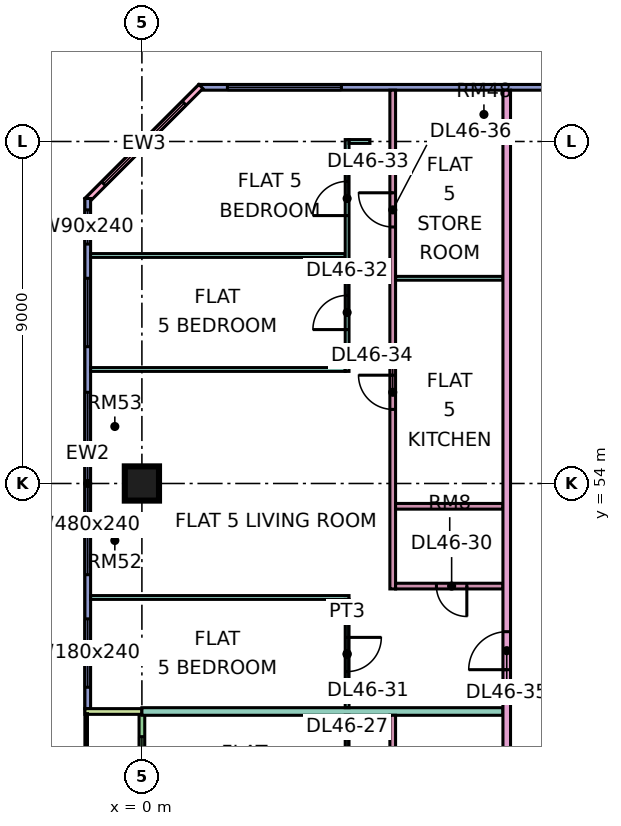
"""IFC4 building model, lengths in metres.
Left out: names, types, materials, properties, quantities, classifications, styles, units other than length and angle.
Written with IfcOpenShell. Run it as: python <this file> out.ifc"""

import sys

from ifc_helpers import new_model, si_unit, direction, frame, frame_2d, origin, origin_2d, place, context, subcontext, project, spatial, rectangle, extrude, element, fill, save


model = new_model("IFC4")
c1 = context("Model", 3, precision=1e-05, world=origin(), true_north=direction((0.0, 1.0)))
c2 = subcontext(c1, "Body", "Model", "MODEL_VIEW")
j1 = project(units=[si_unit("LENGTHUNIT", "METRE"), si_unit("PLANEANGLEUNIT", "RADIAN")], contexts=[c1])
p1 = place(None, origin())
s1 = spatial("IfcSite", under=j1, at=p1, CompositionType="ELEMENT")
p2 = place(p1, origin())
s2 = spatial("IfcBuilding", under=s1, at=p2, CompositionType="ELEMENT")
p3 = place(p2, frame((0.0, 0.0, 198.65)))
s3 = spatial("IfcBuildingStorey", under=s2, at=p3, CompositionType="ELEMENT", Elevation=198.65)
p4 = place(p3, frame((0.0, 54.0, 0.0), z_axis=(0.0, 0.0, 1.0), x_axis=(1.0, 0.0, 0.0)))
e1 = element("IfcColumn", 1, at=p4, inside=s3, PredefinedType="COLUMN", context=c2, shape_type="SweptSolid", body=[
    extrude(rectangle(XDim=0.9, YDim=0.9, at=origin_2d()), origin(), (0.0, 0.0, 1.0), 3.75),
])
p5 = place(p3, frame((11.925, 64.425, 0.0), z_axis=(0.0, 0.0, 1.0), x_axis=(-1.0, 0.0, 0.0)))
e2 = element("IfcWall", 2, at=p5, inside=s3, PredefinedType="SOLIDWALL", context=c2, shape_type="SweptSolid", body=[
    extrude(rectangle(XDim=10.425, YDim=0.15, at=frame_2d((5.212, 0.0))), origin(), (0.0, 0.0, 1.0), 3.35),
])
p6 = place(p5, frame((6.675, 0.0, 0.45)))
e3 = element("IfcOpeningElement", 3, at=p6, cuts=e2, PredefinedType="OPENING", context=c2, shape_type="SweptSolid", body=[
    extrude(rectangle(XDim=3.0, YDim=2.4, at=frame_2d((1.5, 1.2))), frame((0.0, 0.085, 0.0), z_axis=(0.0, -1.0, 0.0), x_axis=(1.0, 0.0, 0.0)), (0.0, 0.0, 1.0), 0.17),
])
p7 = place(p3, frame((1.553, 64.447, 0.0), z_axis=(0.0, 0.0, 1.0), x_axis=(-0.707106781187, -0.707106781187, 0.0)))
e4 = element("IfcWall", 4, at=p7, inside=s3, PredefinedType="SOLIDWALL", context=c2, shape_type="SweptSolid", body=[
    extrude(rectangle(XDim=4.243, YDim=0.15, at=frame_2d((2.121, 0.0))), origin(), (0.0, 0.0, 1.0), 3.35),
])
p8 = place(p7, frame((0.621, 0.0, 0.45)))
e5 = element("IfcOpeningElement", 5, at=p8, cuts=e4, PredefinedType="OPENING", context=c2, shape_type="SweptSolid", body=[
    extrude(rectangle(XDim=3.0, YDim=2.4, at=frame_2d((1.5, 1.2))), frame((0.0, 0.085, 0.0), z_axis=(0.0, -1.0, 0.0), x_axis=(1.0, 0.0, 0.0)), (0.0, 0.0, 1.0), 0.17),
])
p9 = place(p3, frame((-1.425, 61.5, 0.0), z_axis=(0.0, 0.0, 1.0), x_axis=(0.0, -1.0, 0.0)))
e6 = element("IfcWall", 6, at=p9, inside=s3, PredefinedType="SOLIDWALL", context=c2, shape_type="SweptSolid", body=[
    extrude(rectangle(XDim=13.425, YDim=0.15, at=frame_2d((6.712, 0.0))), origin(), (0.0, 0.0, 1.0), 3.35),
])
p10 = place(p9, frame((0.3, 0.0, 0.45)))
e7 = element("IfcOpeningElement", 7, at=p10, cuts=e6, PredefinedType="OPENING", context=c2, shape_type="SweptSolid", body=[
    extrude(rectangle(XDim=0.9, YDim=2.4, at=frame_2d((0.45, 1.2))), frame((0.0, 0.085, 0.0), z_axis=(0.0, -1.0, 0.0), x_axis=(1.0, 0.0, 0.0)), (0.0, 0.0, 1.0), 0.17),
])
p11 = place(p9, frame((2.1, 0.0, 0.45)))
e8 = element("IfcOpeningElement", 8, at=p11, cuts=e6, PredefinedType="OPENING", context=c2, shape_type="SweptSolid", body=[
    extrude(rectangle(XDim=1.8, YDim=2.4, at=frame_2d((0.9, 1.2))), frame((0.0, 0.085, 0.0), z_axis=(0.0, -1.0, 0.0), x_axis=(1.0, 0.0, 0.0)), (0.0, 0.0, 1.0), 0.17),
])
p12 = place(p9, frame((5.1, 0.0, 0.45)))
e9 = element("IfcOpeningElement", 9, at=p12, cuts=e6, PredefinedType="OPENING", context=c2, shape_type="SweptSolid", body=[
    extrude(rectangle(XDim=4.8, YDim=2.4, at=frame_2d((2.4, 1.2))), frame((0.0, 0.085, 0.0), z_axis=(0.0, -1.0, 0.0), x_axis=(1.0, 0.0, 0.0)), (0.0, 0.0, 1.0), 0.17),
])
p13 = place(p9, frame((11.062, 0.0, 0.45)))
e10 = element("IfcOpeningElement", 10, at=p13, cuts=e6, PredefinedType="OPENING", context=c2, shape_type="SweptSolid", body=[
    extrude(rectangle(XDim=1.8, YDim=2.4, at=frame_2d((0.9, 1.2))), frame((0.0, 0.085, 0.0), z_axis=(0.0, -1.0, 0.0), x_axis=(1.0, 0.0, 0.0)), (0.0, 0.0, 1.0), 0.17),
])
p14 = place(p3, frame((0.0, 47.925, 0.0), z_axis=(0.0, 0.0, 1.0), x_axis=(0.0, -1.0, 0.0)))
e11 = element("IfcWall", 11, at=p14, inside=s3, PredefinedType="SOLIDWALL", context=c2, shape_type="SweptSolid", body=[
    extrude(rectangle(XDim=11.85, YDim=0.15, at=frame_2d((5.925, 0.0))), origin(), (0.0, 0.0, 1.0), 3.35),
])
p15 = place(p14, frame((0.587, 0.0, 0.45)))
e12 = element("IfcOpeningElement", 12, at=p15, cuts=e11, PredefinedType="OPENING", context=c2, shape_type="SweptSolid", body=[
    extrude(rectangle(XDim=1.2, YDim=2.4, at=frame_2d((0.6, 1.2))), frame((0.0, 0.085, 0.0), z_axis=(0.0, -1.0, 0.0), x_axis=(1.0, 0.0, 0.0)), (0.0, 0.0, 1.0), 0.17),
])
p16 = place(p14, frame((5.3, 0.0, 0.0)))
e13 = element("IfcOpeningElement", 13, at=p16, cuts=e11, PredefinedType="OPENING", context=c2, shape_type="SweptSolid", body=[
    extrude(rectangle(XDim=1.8, YDim=2.4, at=frame_2d((0.9, 1.2))), frame((0.0, 0.085, 0.0), z_axis=(0.0, -1.0, 0.0), x_axis=(1.0, 0.0, 0.0)), (0.0, 0.0, 1.0), 0.17),
])
p17 = place(p14, frame((9.55, 0.0, 0.45)))
e14 = element("IfcOpeningElement", 14, at=p17, cuts=e11, PredefinedType="OPENING", context=c2, shape_type="SweptSolid", body=[
    extrude(rectangle(XDim=1.2, YDim=2.4, at=frame_2d((0.6, 1.2))), frame((0.0, 0.085, 0.0), z_axis=(0.0, -1.0, 0.0), x_axis=(1.0, 0.0, 0.0)), (0.0, 0.0, 1.0), 0.17),
])
p18 = place(p3, frame((-1.5, 48.0, 0.0), z_axis=(0.0, 0.0, 1.0), x_axis=(1.0, 0.0, 0.0)))
e15 = element("IfcWall", 15, at=p18, inside=s3, PredefinedType="SOLIDWALL", context=c2, shape_type="SweptSolid", body=[
    extrude(rectangle(XDim=1.5, YDim=0.15, at=frame_2d((0.75, 0.0))), origin(), (0.0, 0.0, 1.0), 3.35),
])
p19 = place(p3, frame((-1.351, 60.0, 0.0), z_axis=(0.0, 0.0, 1.0), x_axis=(1.0, 0.0, 0.0)))
e16 = element("IfcWall", 16, at=p19, inside=s3, PredefinedType="PARTITIONING", context=c2, shape_type="SweptSolid", body=[
    extrude(rectangle(XDim=6.701, YDim=0.1, at=frame_2d((3.351, 0.0))), origin(), (0.0, 0.0, 1.0), 3.35),
])
p20 = place(p3, frame((0.0, 48.0, 0.0), z_axis=(0.0, 0.0, 1.0), x_axis=(1.0, 0.0, 0.0)))
e17 = element("IfcWall", 17, at=p20, inside=s3, PredefinedType="PARTITIONING", context=c2, shape_type="SweptSolid", body=[
    extrude(rectangle(XDim=9.5, YDim=0.2, at=frame_2d((4.75, 0.0))), origin(), (0.0, 0.0, 1.0), 3.35),
])
p21 = place(p3, frame((-1.35, 51.0, 0.0), z_axis=(0.0, 0.0, 1.0), x_axis=(1.0, 0.0, 0.0)))
e18 = element("IfcWall", 18, at=p21, inside=s3, PredefinedType="PARTITIONING", context=c2, shape_type="SweptSolid", body=[
    extrude(rectangle(XDim=6.8, YDim=0.1, at=frame_2d((3.4, 0.0))), origin(), (0.0, 0.0, 1.0), 3.35),
])
p22 = place(p3, frame((-1.35, 57.0, 0.0), z_axis=(0.0, 0.0, 1.0), x_axis=(1.0, 0.0, 0.0)))
e19 = element("IfcWall", 19, at=p22, inside=s3, PredefinedType="PARTITIONING", context=c2, shape_type="SweptSolid", body=[
    extrude(rectangle(XDim=6.7, YDim=0.1, at=frame_2d((3.35, 0.0))), origin(), (0.0, 0.0, 1.0), 3.35),
])
p23 = place(p3, frame((5.4, 45.05, 0.0), z_axis=(0.0, 0.0, 1.0), x_axis=(0.0, 1.0, 0.0)))
e20 = element("IfcWall", 20, at=p23, inside=s3, PredefinedType="PARTITIONING", context=c2, shape_type="SweptSolid", body=[
    extrude(rectangle(XDim=2.85, YDim=0.1, at=frame_2d((1.425, 0.0))), origin(), (0.0, 0.0, 1.0), 3.35),
])
p24 = place(p23, frame((1.0, 0.0, 0.0)))
e21 = element("IfcOpeningElement", 21, at=p24, cuts=e20, PredefinedType="OPENING", context=c2, shape_type="SweptSolid", body=[
    extrude(rectangle(XDim=0.9, YDim=2.1, at=frame_2d((0.45, 1.05))), frame((0.0, 0.06, 0.0), z_axis=(0.0, -1.0, 0.0), x_axis=(1.0, 0.0, 0.0)), (0.0, 0.0, 1.0), 0.12),
])
p25 = place(p3, frame((5.4, 48.1, 0.0), z_axis=(0.0, 0.0, 1.0), x_axis=(0.0, 1.0, 0.0)))
e22 = element("IfcWall", 22, at=p25, inside=s3, PredefinedType="PARTITIONING", context=c2, shape_type="SweptSolid", body=[
    extrude(rectangle(XDim=2.85, YDim=0.1, at=frame_2d((1.425, 0.0))), origin(), (0.0, 0.0, 1.0), 3.35),
])
p26 = place(p25, frame((0.95, 0.0, 0.0)))
e23 = element("IfcOpeningElement", 23, at=p26, cuts=e22, PredefinedType="OPENING", context=c2, shape_type="SweptSolid", body=[
    extrude(rectangle(XDim=0.9, YDim=2.1, at=frame_2d((0.45, 1.05))), frame((0.0, 0.06, 0.0), z_axis=(0.0, -1.0, 0.0), x_axis=(1.0, 0.0, 0.0)), (0.0, 0.0, 1.0), 0.12),
])
p27 = place(p3, frame((5.4, 56.95, 0.0), z_axis=(0.0, 0.0, 1.0), x_axis=(0.0, 1.0, 0.0)))
e24 = element("IfcWall", 24, at=p27, inside=s3, PredefinedType="PARTITIONING", context=c2, shape_type="SweptSolid", body=[
    extrude(rectangle(XDim=6.1, YDim=0.1, at=frame_2d((3.05, 0.0))), origin(), (0.0, 0.0, 1.0), 3.35),
])
p28 = place(p27, frame((1.1, 0.0, 0.0)))
e25 = element("IfcOpeningElement", 25, at=p28, cuts=e24, PredefinedType="OPENING", context=c2, shape_type="SweptSolid", body=[
    extrude(rectangle(XDim=0.9, YDim=2.1, at=frame_2d((0.45, 1.05))), frame((0.0, 0.06, 0.0), z_axis=(0.0, -1.0, 0.0), x_axis=(1.0, 0.0, 0.0)), (0.0, 0.0, 1.0), 0.12),
])
p29 = place(p27, frame((4.1, 0.0, 0.0)))
e26 = element("IfcOpeningElement", 26, at=p29, cuts=e24, PredefinedType="OPENING", context=c2, shape_type="SweptSolid", body=[
    extrude(rectangle(XDim=0.9, YDim=2.1, at=frame_2d((0.45, 1.05))), frame((0.0, 0.06, 0.0), z_axis=(0.0, -1.0, 0.0), x_axis=(1.0, 0.0, 0.0)), (0.0, 0.0, 1.0), 0.12),
])
p30 = place(p3, frame((5.45, 63.0, 0.0), z_axis=(0.0, 0.0, 1.0), x_axis=(1.0, 0.0, 0.0)))
e27 = element("IfcWall", 27, at=p30, inside=s3, PredefinedType="PARTITIONING", context=c2, shape_type="SweptSolid", body=[
    extrude(rectangle(XDim=0.55, YDim=0.1, at=frame_2d((0.275, 0.0))), origin(), (0.0, 0.0, 1.0), 3.35),
])
p31 = place(p3, frame((6.6, 39.225, 0.0), z_axis=(0.0, 0.0, 1.0), x_axis=(0.0, 1.0, 0.0)))
e28 = element("IfcWall", 28, at=p31, inside=s3, PredefinedType="PARTITIONING", context=c2, shape_type="SweptSolid", body=[
    extrude(rectangle(XDim=8.675, YDim=0.15, at=frame_2d((4.337, 0.0))), origin(), (0.0, 0.0, 1.0), 3.35),
])
p32 = place(p31, frame((1.125, 0.0, 0.0)))
e29 = element("IfcOpeningElement", 29, at=p32, cuts=e28, PredefinedType="OPENING", context=c2, shape_type="SweptSolid", body=[
    extrude(rectangle(XDim=0.8, YDim=2.1, at=frame_2d((0.4, 1.05))), frame((0.0, 0.085, 0.0), z_axis=(0.0, -1.0, 0.0), x_axis=(1.0, 0.0, 0.0)), (0.0, 0.0, 1.0), 0.17),
])
p33 = place(p31, frame((5.475, 0.0, 0.0)))
e30 = element("IfcOpeningElement", 30, at=p33, cuts=e28, PredefinedType="OPENING", context=c2, shape_type="SweptSolid", body=[
    extrude(rectangle(XDim=0.9, YDim=2.1, at=frame_2d((0.45, 1.05))), frame((0.0, 0.085, 0.0), z_axis=(0.0, -1.0, 0.0), x_axis=(1.0, 0.0, 0.0)), (0.0, 0.0, 1.0), 0.17),
])
p34 = place(p3, frame((6.6, 51.225, 0.0), z_axis=(0.0, 0.0, 1.0), x_axis=(0.0, 1.0, 0.0)))
e31 = element("IfcWall", 31, at=p34, inside=s3, PredefinedType="PARTITIONING", context=c2, shape_type="SweptSolid", body=[
    extrude(rectangle(XDim=13.125, YDim=0.15, at=frame_2d((6.562, 0.0))), origin(), (0.0, 0.0, 1.0), 3.35),
])
p35 = place(p34, frame((4.725, 0.0, 0.0)))
e32 = element("IfcOpeningElement", 32, at=p35, cuts=e31, PredefinedType="OPENING", context=c2, shape_type="SweptSolid", body=[
    extrude(rectangle(XDim=0.9, YDim=2.1, at=frame_2d((0.45, 1.05))), frame((0.0, 0.085, 0.0), z_axis=(0.0, -1.0, 0.0), x_axis=(1.0, 0.0, 0.0)), (0.0, 0.0, 1.0), 0.17),
])
p36 = place(p34, frame((9.525, 0.0, 0.0)))
e33 = element("IfcOpeningElement", 33, at=p36, cuts=e31, PredefinedType="OPENING", context=c2, shape_type="SweptSolid", body=[
    extrude(rectangle(XDim=0.9, YDim=2.1, at=frame_2d((0.45, 1.05))), frame((0.0, 0.085, 0.0), z_axis=(0.0, -1.0, 0.0), x_axis=(1.0, 0.0, 0.0)), (0.0, 0.0, 1.0), 0.17),
])
p37 = place(p3, frame((6.675, 51.3, 0.0), z_axis=(0.0, 0.0, 1.0), x_axis=(1.0, 0.0, 0.0)))
e34 = element("IfcWall", 34, at=p37, inside=s3, PredefinedType="PARTITIONING", context=c2, shape_type="SweptSolid", body=[
    extrude(rectangle(XDim=2.825, YDim=0.15, at=frame_2d((1.413, 0.0))), origin(), (0.0, 0.0, 1.0), 3.35),
])
p38 = place(p37, frame((1.075, 0.0, 0.0)))
e35 = element("IfcOpeningElement", 35, at=p38, cuts=e34, PredefinedType="OPENING", context=c2, shape_type="SweptSolid", body=[
    extrude(rectangle(XDim=0.8, YDim=2.1, at=frame_2d((0.4, 1.05))), frame((0.0, 0.085, 0.0), z_axis=(0.0, -1.0, 0.0), x_axis=(1.0, 0.0, 0.0)), (0.0, 0.0, 1.0), 0.17),
])
p39 = place(p3, frame((6.675, 53.4, 0.0), z_axis=(0.0, 0.0, 1.0), x_axis=(1.0, 0.0, 0.0)))
e36 = element("IfcWall", 36, at=p39, inside=s3, PredefinedType="PARTITIONING", context=c2, shape_type="SweptSolid", body=[
    extrude(rectangle(XDim=2.825, YDim=0.15, at=frame_2d((1.413, 0.0))), origin(), (0.0, 0.0, 1.0), 3.35),
])
p40 = place(p3, frame((6.675, 59.4, 0.0), z_axis=(0.0, 0.0, 1.0), x_axis=(1.0, 0.0, 0.0)))
e37 = element("IfcWall", 37, at=p40, inside=s3, PredefinedType="PARTITIONING", context=c2, shape_type="SweptSolid", body=[
    extrude(rectangle(XDim=2.825, YDim=0.1, at=frame_2d((1.413, 0.0))), origin(), (0.0, 0.0, 1.0), 3.35),
])
p41 = place(p3, frame((9.6, 20.0, 0.0), z_axis=(0.0, 0.0, 1.0), x_axis=(0.0, 1.0, 0.0)))
e38 = element("IfcWall", 38, at=p41, inside=s3, PredefinedType="PARTITIONING", context=c2, shape_type="SweptSolid", body=[
    extrude(rectangle(XDim=44.35, YDim=0.2, at=frame_2d((22.175, 0.0))), origin(), (0.0, 0.0, 1.0), 3.35),
])
p42 = place(p41, frame((17.1, 0.0, 0.0)))
e39 = element("IfcOpeningElement", 39, at=p42, cuts=e38, PredefinedType="OPENING", context=c2, shape_type="SweptSolid", body=[
    extrude(rectangle(XDim=1.0, YDim=2.1, at=frame_2d((0.5, 1.05))), frame((0.0, 0.11, 0.0), z_axis=(0.0, -1.0, 0.0), x_axis=(1.0, 0.0, 0.0)), (0.0, 0.0, 1.0), 0.22),
])
p43 = place(p41, frame((29.1, 0.0, 0.0)))
e40 = element("IfcOpeningElement", 40, at=p43, cuts=e38, PredefinedType="OPENING", context=c2, shape_type="SweptSolid", body=[
    extrude(rectangle(XDim=1.0, YDim=2.1, at=frame_2d((0.5, 1.05))), frame((0.0, 0.11, 0.0), z_axis=(0.0, -1.0, 0.0), x_axis=(1.0, 0.0, 0.0)), (0.0, 0.0, 1.0), 0.22),
])
p44 = place(p41, frame((0.6, 0.0, 0.0)))
e41 = element("IfcOpeningElement", 41, at=p44, cuts=e38, PredefinedType="OPENING", context=c2, shape_type="SweptSolid", body=[
    extrude(rectangle(XDim=1.2, YDim=2.1, at=frame_2d((0.6, 1.05))), frame((0.0, 0.11, 0.0), z_axis=(0.0, -1.0, 0.0), x_axis=(1.0, 0.0, 0.0)), (0.0, 0.0, 1.0), 0.22),
])
p45 = place(p41, frame((4.35, 0.0, 0.0)))
e42 = element("IfcOpeningElement", 42, at=p45, cuts=e38, PredefinedType="OPENING", context=c2, shape_type="SweptSolid", body=[
    extrude(rectangle(XDim=1.0, YDim=2.1, at=frame_2d((0.5, 1.05))), frame((0.0, 0.11, 0.0), z_axis=(0.0, -1.0, 0.0), x_axis=(1.0, 0.0, 0.0)), (0.0, 0.0, 1.0), 0.22),
])
p46 = place(p6, origin())
e43 = element("IfcWindow", 43, at=p46, inside=s3, PartitioningType="SINGLE_PANEL", PredefinedType="WINDOW", context=c2, shape_type="SweptSolid", body=[
    extrude(rectangle(XDim=3.0, YDim=2.4, at=frame_2d((1.5, 1.2))), frame((0.0, 0.03, 0.0), z_axis=(0.0, -1.0, 0.0), x_axis=(1.0, 0.0, 0.0)), (0.0, 0.0, 1.0), 0.06),
])
fill(e3, e43)
p47 = place(p8, origin())
e44 = element("IfcWindow", 44, at=p47, inside=s3, PartitioningType="SINGLE_PANEL", PredefinedType="WINDOW", context=c2, shape_type="SweptSolid", body=[
    extrude(rectangle(XDim=3.0, YDim=2.4, at=frame_2d((1.5, 1.2))), frame((0.0, 0.03, 0.0), z_axis=(0.0, -1.0, 0.0), x_axis=(1.0, 0.0, 0.0)), (0.0, 0.0, 1.0), 0.06),
])
fill(e5, e44)
p48 = place(p10, origin())
e45 = element("IfcWindow", 45, at=p48, inside=s3, PartitioningType="SINGLE_PANEL", PredefinedType="WINDOW", context=c2, shape_type="SweptSolid", body=[
    extrude(rectangle(XDim=0.9, YDim=2.4, at=frame_2d((0.45, 1.2))), frame((0.0, 0.03, 0.0), z_axis=(0.0, -1.0, 0.0), x_axis=(1.0, 0.0, 0.0)), (0.0, 0.0, 1.0), 0.06),
])
fill(e7, e45)
p49 = place(p11, origin())
e46 = element("IfcWindow", 46, at=p49, inside=s3, PartitioningType="SINGLE_PANEL", PredefinedType="WINDOW", context=c2, shape_type="SweptSolid", body=[
    extrude(rectangle(XDim=1.8, YDim=2.4, at=frame_2d((0.9, 1.2))), frame((0.0, 0.03, 0.0), z_axis=(0.0, -1.0, 0.0), x_axis=(1.0, 0.0, 0.0)), (0.0, 0.0, 1.0), 0.06),
])
fill(e8, e46)
p50 = place(p12, origin())
e47 = element("IfcWindow", 47, at=p50, inside=s3, PartitioningType="SINGLE_PANEL", PredefinedType="WINDOW", context=c2, shape_type="SweptSolid", body=[
    extrude(rectangle(XDim=4.8, YDim=2.4, at=frame_2d((2.4, 1.2))), frame((0.0, 0.03, 0.0), z_axis=(0.0, -1.0, 0.0), x_axis=(1.0, 0.0, 0.0)), (0.0, 0.0, 1.0), 0.06),
])
fill(e9, e47)
p51 = place(p13, origin())
e48 = element("IfcWindow", 48, at=p51, inside=s3, PartitioningType="SINGLE_PANEL", PredefinedType="WINDOW", context=c2, shape_type="SweptSolid", body=[
    extrude(rectangle(XDim=1.8, YDim=2.4, at=frame_2d((0.9, 1.2))), frame((0.0, 0.03, 0.0), z_axis=(0.0, -1.0, 0.0), x_axis=(1.0, 0.0, 0.0)), (0.0, 0.0, 1.0), 0.06),
])
fill(e10, e48)
p52 = place(p15, origin())
e49 = element("IfcWindow", 49, at=p52, inside=s3, PartitioningType="SINGLE_PANEL", PredefinedType="WINDOW", context=c2, shape_type="SweptSolid", body=[
    extrude(rectangle(XDim=1.2, YDim=2.4, at=frame_2d((0.6, 1.2))), frame((0.0, 0.03, 0.0), z_axis=(0.0, -1.0, 0.0), x_axis=(1.0, 0.0, 0.0)), (0.0, 0.0, 1.0), 0.06),
])
fill(e12, e49)
p53 = place(p38, origin())
e50 = element("IfcDoor", 50, at=p53, inside=s3, OperationType="SINGLE_SWING_RIGHT", PredefinedType="DOOR", context=c2, shape_type="SweptSolid", body=[
    extrude(rectangle(XDim=0.8, YDim=2.1, at=frame_2d((0.4, 1.05))), frame((0.0, 0.025, 0.0), z_axis=(0.0, -1.0, 0.0), x_axis=(1.0, 0.0, 0.0)), (0.0, 0.0, 1.0), 0.05),
])
fill(e35, e50)
p54 = place(p26, origin())
e51 = element("IfcDoor", 51, at=p54, inside=s3, OperationType="SINGLE_SWING_RIGHT", PredefinedType="DOOR", context=c2, shape_type="SweptSolid", body=[
    extrude(rectangle(XDim=0.9, YDim=2.1, at=frame_2d((0.45, 1.05))), frame((0.0, 0.025, 0.0), z_axis=(0.0, -1.0, 0.0), x_axis=(1.0, 0.0, 0.0)), (0.0, 0.0, 1.0), 0.05),
])
fill(e23, e51)
p55 = place(p28, origin())
e52 = element("IfcDoor", 52, at=p55, inside=s3, OperationType="SINGLE_SWING_LEFT", PredefinedType="DOOR", context=c2, shape_type="SweptSolid", body=[
    extrude(rectangle(XDim=0.9, YDim=2.1, at=frame_2d((0.45, 1.05))), frame((0.0, 0.025, 0.0), z_axis=(0.0, -1.0, 0.0), x_axis=(1.0, 0.0, 0.0)), (0.0, 0.0, 1.0), 0.05),
])
fill(e25, e52)
p56 = place(p29, origin())
e53 = element("IfcDoor", 53, at=p56, inside=s3, OperationType="SINGLE_SWING_LEFT", PredefinedType="DOOR", context=c2, shape_type="SweptSolid", body=[
    extrude(rectangle(XDim=0.9, YDim=2.1, at=frame_2d((0.45, 1.05))), frame((0.0, 0.025, 0.0), z_axis=(0.0, -1.0, 0.0), x_axis=(1.0, 0.0, 0.0)), (0.0, 0.0, 1.0), 0.05),
])
fill(e26, e53)
p57 = place(p35, frame((0.9, 0.0, 0.0), z_axis=(0.0, 0.0, 1.0), x_axis=(-1.0, 0.0, 0.0)))
e54 = element("IfcDoor", 54, at=p57, inside=s3, OperationType="SINGLE_SWING_RIGHT", PredefinedType="DOOR", context=c2, shape_type="SweptSolid", body=[
    extrude(rectangle(XDim=0.9, YDim=2.1, at=frame_2d((0.45, 1.05))), frame((0.0, 0.025, 0.0), z_axis=(0.0, -1.0, 0.0), x_axis=(1.0, 0.0, 0.0)), (0.0, 0.0, 1.0), 0.05),
])
fill(e32, e54)
p58 = place(p43, origin())
e55 = element("IfcDoor", 55, at=p58, inside=s3, OperationType="SINGLE_SWING_LEFT", PredefinedType="DOOR", context=c2, shape_type="SweptSolid", body=[
    extrude(rectangle(XDim=1.0, YDim=2.1, at=frame_2d((0.5, 1.05))), frame((0.0, 0.025, 0.0), z_axis=(0.0, -1.0, 0.0), x_axis=(1.0, 0.0, 0.0)), (0.0, 0.0, 1.0), 0.05),
])
fill(e40, e55)
p59 = place(p36, frame((0.9, 0.0, 0.0), z_axis=(0.0, 0.0, 1.0), x_axis=(-1.0, 0.0, 0.0)))
e56 = element("IfcDoor", 56, at=p59, inside=s3, OperationType="SINGLE_SWING_RIGHT", PredefinedType="DOOR", context=c2, shape_type="SweptSolid", body=[
    extrude(rectangle(XDim=0.9, YDim=2.1, at=frame_2d((0.45, 1.05))), frame((0.0, 0.025, 0.0), z_axis=(0.0, -1.0, 0.0), x_axis=(1.0, 0.0, 0.0)), (0.0, 0.0, 1.0), 0.05),
])
fill(e33, e56)
save(model, sys.argv[1])
